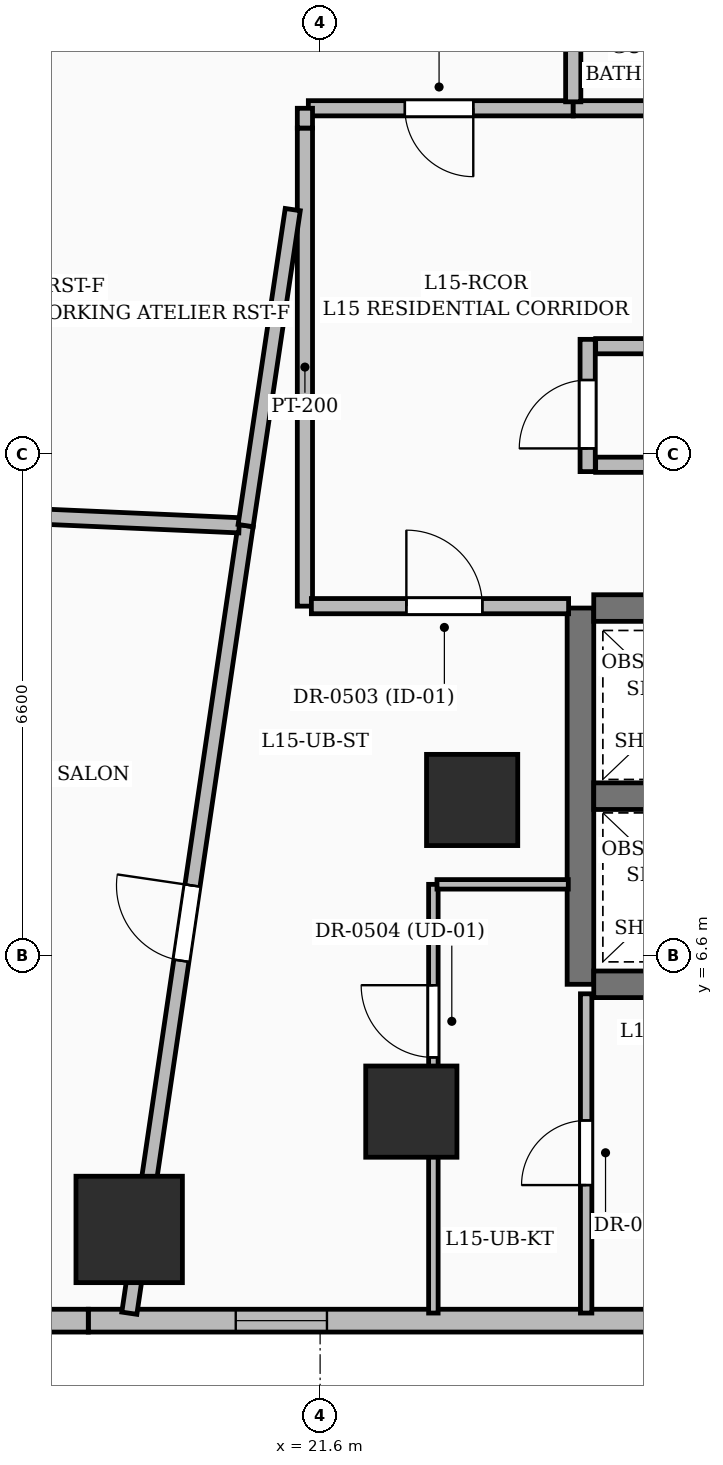
"""IFC4 building model, lengths in metres.
Left out: names, types, materials, properties, quantities, classifications, styles, units other than length and angle.
Written with IfcOpenShell. Run it as: python <this file> out.ifc"""

import sys

from ifc_helpers import new_model, si_unit, direction, frame, frame_2d, origin, origin_2d, place, context, subcontext, project, spatial, rectangle, extrude, element, fill, save


model = new_model("IFC4")
c1 = context("Model", 3, precision=1e-05, world=origin(), true_north=direction((0.0, 1.0)))
c2 = subcontext(c1, "Body", "Model", "MODEL_VIEW")
j1 = project(units=[si_unit("LENGTHUNIT", "METRE"), si_unit("PLANEANGLEUNIT", "RADIAN")], contexts=[c1])
p1 = place(None, origin())
s1 = spatial("IfcSite", under=j1, at=p1, CompositionType="ELEMENT")
p2 = place(p1, origin())
s2 = spatial("IfcBuilding", under=s1, at=p2, CompositionType="ELEMENT")
p3 = place(p2, frame((0.0, 0.0, 64.2)))
s3 = spatial("IfcBuildingStorey", under=s2, at=p3, CompositionType="ELEMENT", Elevation=64.2)
for number, where, z_axis, x_axis in (
    (1, (22.8, 4.55, 0.0), (0.0, 0.0, 1.0), (1.0, 0.0, 0.0)),
    (2, (23.6, 8.65, 0.0), (0.0, 0.0, 1.0), (1.0, 0.0, 0.0)),
):
    element("IfcColumn", number, at=place(p3, frame(where, z_axis=z_axis, x_axis=x_axis)), inside=s3, PredefinedType="COLUMN", context=c2, shape_type="SweptSolid", body=[
        extrude(rectangle(XDim=1.2, YDim=1.2, at=origin_2d()), origin(), (0.0, 0.0, 1.0), 3.6),
    ])
p4 = place(p3, frame((25.025, 6.225, 0.0), z_axis=(0.0, 0.0, 1.0), x_axis=(0.0, 1.0, 0.0)))
e3 = element("IfcWall", 3, at=p4, inside=s3, PredefinedType="SOLIDWALL", context=c2, shape_type="SweptSolid", body=[
    extrude(rectangle(XDim=4.95, YDim=0.35, at=frame_2d((2.475, 0.0))), origin(), (0.0, 0.0, 1.0), 3.6),
])
for number, where, z_axis, x_axis in (
    (4, (25.2, 6.225, 0.0), (0.0, 0.0, 1.0), (1.0, 0.0, 0.0)),
    (5, (25.2, 8.7, 0.0), (0.0, 0.0, 1.0), (1.0, 0.0, 0.0)),
    (6, (25.2, 11.175, 0.0), (0.0, 0.0, 1.0), (1.0, 0.0, 0.0)),
):
    element("IfcWall", number, at=place(p3, frame(where, z_axis=z_axis, x_axis=x_axis)), inside=s3, PredefinedType="SOLIDWALL", context=c2, shape_type="SweptSolid", body=[
        extrude(rectangle(XDim=1.9, YDim=0.35, at=frame_2d((0.95, 0.0))), origin(), (0.0, 0.0, 1.0), 3.6),
    ])
p5 = place(p3, frame((19.088, 3.0, 0.0), z_axis=(0.0, 0.0, 1.0), x_axis=(1.0, 0.0, 0.0)))
e7 = element("IfcColumn", 7, at=p5, inside=s3, PredefinedType="COLUMN", context=c2, shape_type="SweptSolid", body=[
    extrude(rectangle(XDim=1.4, YDim=1.4, at=origin_2d()), origin(), (0.0, 0.0, 1.0), 3.6),
])
p6 = place(p3, frame((25.96, 1.8, 0.0), z_axis=(0.0, 0.0, 1.0), x_axis=(-1.0, 0.0, 0.0)))
e8 = element("IfcWall", 8, at=p6, inside=s3, PredefinedType="SOLIDWALL", context=c2, shape_type="SweptSolid", body=[
    extrude(rectangle(XDim=7.41, YDim=0.3, at=frame_2d((3.705, 0.0))), origin(), (0.0, 0.0, 1.0), 3.35),
])
p7 = place(p6, frame((4.27, 0.0, 0.8)))
e9 = element("IfcOpeningElement", 9, at=p7, cuts=e8, PredefinedType="OPENING", context=c2, shape_type="SweptSolid", body=[
    extrude(rectangle(XDim=1.2, YDim=1.8, at=frame_2d((0.6, 0.9))), frame((0.0, 0.16, 0.0), z_axis=(0.0, -1.0, 0.0), x_axis=(1.0, 0.0, 0.0)), (0.0, 0.0, 1.0), 0.32),
])
p8 = place(p3, frame((18.55, 1.8, 0.0), z_axis=(0.0, 0.0, 1.0), x_axis=(-1.0, 0.0, 0.0)))
e10 = element("IfcWall", 10, at=p8, inside=s3, PredefinedType="SOLIDWALL", context=c2, shape_type="SweptSolid", body=[
    extrude(rectangle(XDim=7.69, YDim=0.3, at=frame_2d((3.845, 0.0))), origin(), (0.0, 0.0, 1.0), 3.35),
])
p9 = place(p8, frame((1.575, 0.0, 0.6)))
e11 = element("IfcOpeningElement", 11, at=p9, cuts=e10, PredefinedType="OPENING", context=c2, shape_type="SweptSolid", body=[
    extrude(rectangle(XDim=2.4, YDim=2.1, at=frame_2d((1.2, 1.05))), frame((0.0, 0.16, 0.0), z_axis=(0.0, -1.0, 0.0), x_axis=(1.0, 0.0, 0.0)), (0.0, 0.0, 1.0), 0.32),
])
p10 = place(p3, frame((16.306, 18.197, 0.0), z_axis=(0.0, 0.0, 1.0), x_axis=(0.53952943892, 0.841966736005, 0.0)))
e12 = element("IfcWall", 12, at=p10, inside=s3, PredefinedType="SOLIDWALL", context=c2, shape_type="SweptSolid", body=[
    extrude(rectangle(XDim=7.207, YDim=0.3, at=frame_2d((3.604, 0.0))), origin(), (0.0, 0.0, 1.0), 3.35),
])
p11 = place(p10, frame((2.475, 0.0, 0.55)))
e13 = element("IfcOpeningElement", 13, at=p11, cuts=e12, PredefinedType="OPENING", context=c2, shape_type="SweptSolid", body=[
    extrude(rectangle(XDim=2.1, YDim=2.4, at=frame_2d((1.05, 1.2))), frame((0.0, 0.16, 0.0), z_axis=(0.0, -1.0, 0.0), x_axis=(1.0, 0.0, 0.0)), (0.0, 0.0, 1.0), 0.32),
])
p12 = place(p3, frame((25.12, 12.97, 0.0), z_axis=(0.0, 0.0, 1.0), x_axis=(0.0, 1.0, 0.0)))
e14 = element("IfcWall", 14, at=p12, inside=s3, PredefinedType="PARTITIONING", context=c2, shape_type="SweptSolid", body=[
    extrude(rectangle(XDim=1.74, YDim=0.2, at=frame_2d((0.87, 0.0))), origin(), (0.0, 0.0, 1.0), 3.35),
])
p13 = place(p12, frame((0.305, 0.0, 0.0)))
e15 = element("IfcOpeningElement", 15, at=p13, cuts=e14, PredefinedType="OPENING", context=c2, shape_type="SweptSolid", body=[
    extrude(rectangle(XDim=0.9, YDim=2.1, at=frame_2d((0.45, 1.05))), frame((0.0, 0.11, 0.0), z_axis=(0.0, -1.0, 0.0), x_axis=(1.0, 0.0, 0.0)), (0.0, 0.0, 1.0), 0.22),
])
for number, where, z_axis, x_axis in (
    (16, (25.225, 14.62, 0.0), (0.0, 0.0, 1.0), (1.0, 0.0, 0.0)),
    (17, (25.225, 13.06, 0.0), (0.0, 0.0, 1.0), (1.0, 0.0, 0.0)),
):
    element("IfcWall", number, at=place(p3, frame(where, z_axis=z_axis, x_axis=x_axis)), inside=s3, PredefinedType="PARTITIONING", context=c2, shape_type="SweptSolid", body=[
        extrude(rectangle(XDim=1.86, YDim=0.2, at=frame_2d((0.93, 0.0))), origin(), (0.0, 0.0, 1.0), 3.35),
    ])
p14 = place(p3, frame((21.4, 17.49, 0.0), z_axis=(0.0, 0.0, 1.0), x_axis=(0.0, -1.0, 0.0)))
e18 = element("IfcWall", 18, at=p14, inside=s3, PredefinedType="PARTITIONING", context=c2, shape_type="SweptSolid", body=[
    extrude(rectangle(XDim=6.29, YDim=0.2, at=frame_2d((3.145, 0.0))), origin(), (0.0, 0.0, 1.0), 2.771),
])
p15 = place(p3, frame((21.485, 11.2, 0.0), z_axis=(0.0, 0.0, 1.0), x_axis=(1.0, 0.0, 0.0)))
e19 = element("IfcWall", 19, at=p15, inside=s3, PredefinedType="PARTITIONING", context=c2, shape_type="SweptSolid", body=[
    extrude(rectangle(XDim=3.384, YDim=0.2, at=frame_2d((1.692, 0.0))), origin(), (0.0, 0.0, 1.0), 2.771),
])
p16 = place(p15, frame((1.25, 0.0, 0.0)))
e20 = element("IfcOpeningElement", 20, at=p16, cuts=e19, PredefinedType="OPENING", context=c2, shape_type="SweptSolid", body=[
    extrude(rectangle(XDim=1.0, YDim=2.2, at=frame_2d((0.5, 1.1))), frame((0.0, 0.11, 0.0), z_axis=(0.0, -1.0, 0.0), x_axis=(1.0, 0.0, 0.0)), (0.0, 0.0, 1.0), 0.22),
])
p17 = place(p3, frame((24.93, 17.75, 0.0), z_axis=(0.0, 0.0, 1.0), x_axis=(-1.0, 0.0, 0.0)))
e21 = element("IfcWall", 21, at=p17, inside=s3, PredefinedType="PARTITIONING", context=c2, shape_type="SweptSolid", body=[
    extrude(rectangle(XDim=3.485, YDim=0.2, at=frame_2d((1.742, 0.0))), origin(), (0.0, 0.0, 1.0), 2.279),
])
p18 = place(p17, frame((1.315, 0.0, 0.0)))
e22 = element("IfcOpeningElement", 22, at=p18, cuts=e21, PredefinedType="OPENING", context=c2, shape_type="SweptSolid", body=[
    extrude(rectangle(XDim=0.9, YDim=2.1, at=frame_2d((0.45, 1.05))), frame((0.0, 0.11, 0.0), z_axis=(0.0, -1.0, 0.0), x_axis=(1.0, 0.0, 0.0)), (0.0, 0.0, 1.0), 0.22),
])
p19 = place(p3, frame((21.4, 17.75, 0.0), z_axis=(0.0, 0.0, 1.0), x_axis=(0.0, -1.0, 0.0)))
e23 = element("IfcWall", 23, at=p19, inside=s3, PredefinedType="PARTITIONING", context=c2, shape_type="SweptSolid", body=[
    extrude(rectangle(XDim=0.26, YDim=0.2, at=frame_2d((0.13, 0.0))), origin(), (0.0, 0.0, 1.0), 3.35),
])
p20 = place(p3, frame((28.02, 17.75, 0.0), z_axis=(0.0, 0.0, 1.0), x_axis=(-1.0, 0.0, 0.0)))
e24 = element("IfcWall", 24, at=p20, inside=s3, PredefinedType="PARTITIONING", context=c2, shape_type="SweptSolid", body=[
    extrude(rectangle(XDim=3.09, YDim=0.2, at=frame_2d((1.545, 0.0))), origin(), (0.0, 0.0, 1.0), 2.771),
])
p21 = place(p3, frame((19.09, 1.898, 0.0), z_axis=(0.0, 0.0, 1.0), x_axis=(0.146073061153, 0.989273804771, 0.0)))
e25 = element("IfcWall", 25, at=p21, inside=s3, PredefinedType="PARTITIONING", context=c2, shape_type="SweptSolid", body=[
    extrude(rectangle(XDim=10.474, YDim=0.2, at=frame_2d((5.237, 0.0))), origin(), (0.0, 0.0, 1.0), 2.279),
])
p22 = place(p21, frame((4.688, 0.0, 0.0)))
e26 = element("IfcOpeningElement", 26, at=p22, cuts=e25, PredefinedType="OPENING", context=c2, shape_type="SweptSolid", body=[
    extrude(rectangle(XDim=1.0, YDim=2.2, at=frame_2d((0.5, 1.1))), frame((0.0, 0.11, 0.0), z_axis=(0.0, -1.0, 0.0), x_axis=(1.0, 0.0, 0.0)), (0.0, 0.0, 1.0), 0.22),
])
p23 = place(p3, frame((20.535, 12.263, 0.0), z_axis=(0.0, 0.0, 1.0), x_axis=(-0.999022029659, 0.044215203896, 0.0)))
e27 = element("IfcWall", 27, at=p23, inside=s3, PredefinedType="PARTITIONING", context=c2, shape_type="SweptSolid", body=[
    extrude(rectangle(XDim=7.681, YDim=0.2, at=frame_2d((3.84, 0.0))), origin(), (0.0, 0.0, 1.0), 2.37),
])
p24 = place(p3, frame((23.09, 1.9, 0.0), z_axis=(0.0, 0.0, 1.0), x_axis=(0.0, 1.0, 0.0)))
e28 = element("IfcWall", 28, at=p24, inside=s3, PredefinedType="PARTITIONING", context=c2, shape_type="SweptSolid", body=[
    extrude(rectangle(XDim=5.64, YDim=0.125, at=frame_2d((2.82, 0.0))), origin(), (0.0, 0.0, 1.0), 2.37),
])
p25 = place(p24, frame((3.363, 0.0, 0.0)))
e29 = element("IfcOpeningElement", 29, at=p25, cuts=e28, PredefinedType="OPENING", context=c2, shape_type="SweptSolid", body=[
    extrude(rectangle(XDim=0.95, YDim=2.2, at=frame_2d((0.475, 1.1))), frame((0.0, 0.072, 0.0), z_axis=(0.0, -1.0, 0.0), x_axis=(1.0, 0.0, 0.0)), (0.0, 0.0, 1.0), 0.145),
])
p26 = place(p3, frame((23.137, 7.54, 0.0), z_axis=(0.0, 0.0, 1.0), x_axis=(1.0, 0.0, 0.0)))
e30 = element("IfcWall", 30, at=p26, inside=s3, PredefinedType="PARTITIONING", context=c2, shape_type="SweptSolid", body=[
    extrude(rectangle(XDim=1.728, YDim=0.125, at=frame_2d((0.864, 0.0))), origin(), (0.0, 0.0, 1.0), 3.35),
])
p27 = place(p3, frame((21.24, 16.417, 0.0), z_axis=(0.0, 0.0, 1.0), x_axis=(-0.147485410428, -0.989064231337, 0.0)))
e31 = element("IfcWall", 31, at=p27, inside=s3, PredefinedType="PARTITIONING", context=c2, shape_type="SweptSolid", body=[
    extrude(rectangle(XDim=4.203, YDim=0.2, at=frame_2d((2.102, 0.0))), origin(), (0.0, 0.0, 1.0), 2.771),
])
p28 = place(p3, frame((25.1, 1.9, 0.0), z_axis=(0.0, 0.0, 1.0), x_axis=(0.0, 1.0, 0.0)))
e32 = element("IfcWall", 32, at=p28, inside=s3, PredefinedType="PARTITIONING", context=c2, shape_type="SweptSolid", body=[
    extrude(rectangle(XDim=4.2, YDim=0.15, at=frame_2d((2.1, 0.0))), origin(), (0.0, 0.0, 1.0), 2.309),
])
p29 = place(p28, frame((1.684, 0.0, 0.0)))
e33 = element("IfcOpeningElement", 33, at=p29, cuts=e32, PredefinedType="OPENING", context=c2, shape_type="SweptSolid", body=[
    extrude(rectangle(XDim=0.85, YDim=2.1, at=frame_2d((0.425, 1.05))), frame((0.0, 0.085, 0.0), z_axis=(0.0, -1.0, 0.0), x_axis=(1.0, 0.0, 0.0)), (0.0, 0.0, 1.0), 0.17),
])
p30 = place(p3, frame((24.93, 17.835, 0.0), z_axis=(0.0, 0.0, 1.0), x_axis=(0.0, 1.0, 0.0)))
e34 = element("IfcWall", 34, at=p30, inside=s3, PredefinedType="PARTITIONING", context=c2, shape_type="SweptSolid", body=[
    extrude(rectangle(XDim=2.995, YDim=0.2, at=frame_2d((1.498, 0.0))), origin(), (0.0, 0.0, 1.0), 2.771),
])
p31 = place(p7, origin())
e35 = element("IfcWindow", 35, at=p31, inside=s3, PartitioningType="SINGLE_PANEL", PredefinedType="WINDOW", context=c2, shape_type="SweptSolid", body=[
    extrude(rectangle(XDim=1.2, YDim=1.8, at=frame_2d((0.6, 0.9))), frame((0.0, 0.03, 0.0), z_axis=(0.0, -1.0, 0.0), x_axis=(1.0, 0.0, 0.0)), (0.0, 0.0, 1.0), 0.06),
])
fill(e9, e35)
p32 = place(p13, origin())
e36 = element("IfcDoor", 36, at=p32, inside=s3, OperationType="SINGLE_SWING_LEFT", PredefinedType="DOOR", context=c2, shape_type="SweptSolid", body=[
    extrude(rectangle(XDim=0.9, YDim=2.1, at=frame_2d((0.45, 1.05))), frame((0.0, 0.025, 0.0), z_axis=(0.0, -1.0, 0.0), x_axis=(1.0, 0.0, 0.0)), (0.0, 0.0, 1.0), 0.05),
])
fill(e15, e36)
p33 = place(p18, origin())
e37 = element("IfcDoor", 37, at=p33, inside=s3, OperationType="SINGLE_SWING_LEFT", PredefinedType="DOOR", context=c2, shape_type="SweptSolid", body=[
    extrude(rectangle(XDim=0.9, YDim=2.1, at=frame_2d((0.45, 1.05))), frame((0.0, 0.025, 0.0), z_axis=(0.0, -1.0, 0.0), x_axis=(1.0, 0.0, 0.0)), (0.0, 0.0, 1.0), 0.05),
])
fill(e22, e37)
p34 = place(p16, origin())
e38 = element("IfcDoor", 38, at=p34, inside=s3, OperationType="SINGLE_SWING_LEFT", PredefinedType="DOOR", context=c2, shape_type="SweptSolid", body=[
    extrude(rectangle(XDim=1.0, YDim=2.2, at=frame_2d((0.5, 1.1))), frame((0.0, 0.025, 0.0), z_axis=(0.0, -1.0, 0.0), x_axis=(1.0, 0.0, 0.0)), (0.0, 0.0, 1.0), 0.05),
])
fill(e20, e38)
p35 = place(p25, origin())
e39 = element("IfcDoor", 39, at=p35, inside=s3, OperationType="SINGLE_SWING_RIGHT", PredefinedType="DOOR", context=c2, shape_type="SweptSolid", body=[
    extrude(rectangle(XDim=0.95, YDim=2.2, at=frame_2d((0.475, 1.1))), frame((0.0, 0.025, 0.0), z_axis=(0.0, -1.0, 0.0), x_axis=(1.0, 0.0, 0.0)), (0.0, 0.0, 1.0), 0.05),
])
fill(e29, e39)
p36 = place(p29, origin())
e40 = element("IfcDoor", 40, at=p36, inside=s3, OperationType="SINGLE_SWING_LEFT", PredefinedType="DOOR", context=c2, shape_type="SweptSolid", body=[
    extrude(rectangle(XDim=0.85, YDim=2.1, at=frame_2d((0.425, 1.05))), frame((0.0, 0.025, 0.0), z_axis=(0.0, -1.0, 0.0), x_axis=(1.0, 0.0, 0.0)), (0.0, 0.0, 1.0), 0.05),
])
fill(e33, e40)
p37 = place(p22, origin())
e41 = element("IfcDoor", 41, at=p37, inside=s3, OperationType="SINGLE_SWING_RIGHT", PredefinedType="DOOR", context=c2, shape_type="SweptSolid", body=[
    extrude(rectangle(XDim=1.0, YDim=2.2, at=frame_2d((0.5, 1.1))), frame((0.0, 0.025, 0.0), z_axis=(0.0, -1.0, 0.0), x_axis=(1.0, 0.0, 0.0)), (0.0, 0.0, 1.0), 0.05),
])
fill(e26, e41)
save(model, sys.argv[1])
